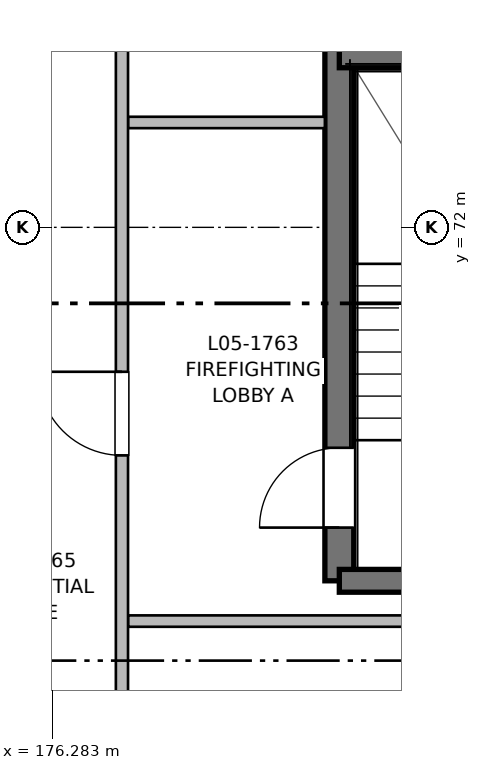
"""IFC4 building model, lengths in metres.
Left out: names, types, materials, properties, quantities, classifications, styles, units other than length and angle.
Written with IfcOpenShell. Run it as: python <this file> out.ifc"""

import sys

from ifc_helpers import new_model, si_unit, direction, frame, frame_2d, origin, place, context, subcontext, project, spatial, rectangle, extrude, element, fill, save


model = new_model("IFC4")
c1 = context("Model", 3, precision=1e-05, world=origin(), true_north=direction((0.0, 1.0)))
c2 = subcontext(c1, "Body", "Model", "MODEL_VIEW")
j1 = project(units=[si_unit("LENGTHUNIT", "METRE"), si_unit("PLANEANGLEUNIT", "RADIAN")], contexts=[c1])
p1 = place(None, origin())
s1 = spatial("IfcSite", under=j1, at=p1, CompositionType="ELEMENT")
p2 = place(p1, origin())
s2 = spatial("IfcBuilding", under=s1, at=p2, CompositionType="ELEMENT")
p3 = place(p2, frame((0.0, 0.0, 16.96)))
s3 = spatial("IfcBuildingStorey", under=s2, at=p3, CompositionType="ELEMENT", Elevation=16.96)
p4 = place(p3, frame((180.06, 67.35, 0.0), z_axis=(0.0, 0.0, 1.0), x_axis=(0.0, 1.0, 0.0)))
e1 = element("IfcWall", 1, at=p4, inside=s3, PredefinedType="SHEAR", context=c2, shape_type="SweptSolid", body=[
    extrude(rectangle(XDim=13.15, YDim=0.38, at=frame_2d((6.575, 0.0))), origin(), (0.0, 0.0, 1.0), 3.2),
])
p5 = place(p4, frame((0.7, 0.0, 0.0)))
e2 = element("IfcOpeningElement", 2, at=p5, cuts=e1, PredefinedType="OPENING", context=c2, shape_type="SweptSolid", body=[
    extrude(rectangle(XDim=1.05, YDim=2.15, at=frame_2d((0.525, 1.075))), frame((0.0, 0.2, 0.0), z_axis=(0.0, -1.0, 0.0), x_axis=(1.0, 0.0, 0.0)), (0.0, 0.0, 1.0), 0.4),
])
p6 = place(p3, frame((183.47, 67.35, 0.0), z_axis=(0.0, 0.0, 1.0), x_axis=(-1.0, 0.0, 0.0)))
e3 = element("IfcWall", 3, at=p6, inside=s3, PredefinedType="SHEAR", context=c2, shape_type="SweptSolid", body=[
    extrude(rectangle(XDim=3.41, YDim=0.3, at=frame_2d((1.705, 0.0))), origin(), (0.0, 0.0, 1.0), 3.2),
])
p7 = place(p3, frame((180.06, 74.24, 0.0), z_axis=(0.0, 0.0, 1.0), x_axis=(1.0, 0.0, 0.0)))
e4 = element("IfcWall", 4, at=p7, inside=s3, PredefinedType="SHEAR", context=c2, shape_type="SweptSolid", body=[
    extrude(rectangle(XDim=3.41, YDim=0.28, at=frame_2d((1.705, 0.0))), origin(), (0.0, 0.0, 1.0), 3.2),
])
p8 = place(p3, frame((177.28, 66.82, 0.0), z_axis=(0.0, 0.0, 1.0), x_axis=(1.0, 0.0, 0.0)))
e5 = element("IfcWall", 5, at=p8, inside=s3, PredefinedType="PARTITIONING", context=c2, shape_type="SweptSolid", body=[
    extrude(rectangle(XDim=6.59, YDim=0.15, at=frame_2d((3.295, 0.0))), origin(), (0.0, 0.0, 1.0), 2.935),
])
p9 = place(p3, frame((177.28, 73.38, 0.0), z_axis=(0.0, 0.0, 1.0), x_axis=(1.0, 0.0, 0.0)))
e6 = element("IfcWall", 6, at=p9, inside=s3, PredefinedType="PARTITIONING", context=c2, shape_type="SweptSolid", body=[
    extrude(rectangle(XDim=2.59, YDim=0.15, at=frame_2d((1.295, 0.0))), origin(), (0.0, 0.0, 1.0), 2.935),
])
p10 = place(p3, frame((177.2, 56.16, 0.0), z_axis=(0.0, 0.0, 1.0), x_axis=(0.0, 1.0, 0.0)))
e7 = element("IfcWall", 7, at=p10, inside=s3, PredefinedType="PARTITIONING", context=c2, shape_type="SweptSolid", body=[
    extrude(rectangle(XDim=50.64, YDim=0.16, at=frame_2d((25.32, 0.0))), origin(), (0.0, 0.0, 1.0), 2.935),
])
p11 = place(p10, frame((12.84, 0.0, 0.0)))
e8 = element("IfcOpeningElement", 8, at=p11, cuts=e7, PredefinedType="OPENING", context=c2, shape_type="SweptSolid", body=[
    extrude(rectangle(XDim=1.1, YDim=2.15, at=frame_2d((0.55, 1.075))), frame((0.0, 0.09, 0.0), z_axis=(0.0, -1.0, 0.0), x_axis=(1.0, 0.0, 0.0)), (0.0, 0.0, 1.0), 0.18),
])
p12 = place(p10, frame((19.24, 0.0, 0.0)))
e9 = element("IfcOpeningElement", 9, at=p12, cuts=e7, PredefinedType="OPENING", context=c2, shape_type="SweptSolid", body=[
    extrude(rectangle(XDim=1.6, YDim=2.15, at=frame_2d((0.8, 1.075))), frame((0.0, 0.09, 0.0), z_axis=(0.0, -1.0, 0.0), x_axis=(1.0, 0.0, 0.0)), (0.0, 0.0, 1.0), 0.18),
])
p13 = place(p10, frame((1.8, 0.0, 0.0)))
e10 = element("IfcOpeningElement", 10, at=p13, cuts=e7, PredefinedType="OPENING", context=c2, shape_type="SweptSolid", body=[
    extrude(rectangle(XDim=0.96, YDim=2.15, at=frame_2d((0.48, 1.075))), frame((0.0, 0.09, 0.0), z_axis=(0.0, -1.0, 0.0), x_axis=(1.0, 0.0, 0.0)), (0.0, 0.0, 1.0), 0.18),
])
p14 = place(p10, frame((33.17, 0.0, 0.0)))
e11 = element("IfcOpeningElement", 11, at=p14, cuts=e7, PredefinedType="OPENING", context=c2, shape_type="SweptSolid", body=[
    extrude(rectangle(XDim=0.98, YDim=2.15, at=frame_2d((0.49, 1.075))), frame((0.0, 0.09, 0.0), z_axis=(0.0, -1.0, 0.0), x_axis=(1.0, 0.0, 0.0)), (0.0, 0.0, 1.0), 0.18),
])
p15 = place(p10, frame((41.43, 0.0, 0.0)))
e12 = element("IfcOpeningElement", 12, at=p15, cuts=e7, PredefinedType="OPENING", context=c2, shape_type="SweptSolid", body=[
    extrude(rectangle(XDim=0.98, YDim=2.15, at=frame_2d((0.49, 1.075))), frame((0.0, 0.09, 0.0), z_axis=(0.0, -1.0, 0.0), x_axis=(1.0, 0.0, 0.0)), (0.0, 0.0, 1.0), 0.18),
])
p16 = place(p5, origin())
e13 = element("IfcDoor", 13, at=p16, inside=s3, OperationType="SINGLE_SWING_LEFT", PredefinedType="DOOR", context=c2, shape_type="SweptSolid", body=[
    extrude(rectangle(XDim=1.05, YDim=2.15, at=frame_2d((0.525, 1.075))), frame((0.0, 0.025, 0.0), z_axis=(0.0, -1.0, 0.0), x_axis=(1.0, 0.0, 0.0)), (0.0, 0.0, 1.0), 0.05),
])
fill(e2, e13)
p17 = place(p11, origin())
e14 = element("IfcDoor", 14, at=p17, inside=s3, OperationType="SINGLE_SWING_RIGHT", PredefinedType="DOOR", context=c2, shape_type="SweptSolid", body=[
    extrude(rectangle(XDim=1.1, YDim=2.15, at=frame_2d((0.55, 1.075))), frame((0.0, 0.025, 0.0), z_axis=(0.0, -1.0, 0.0), x_axis=(1.0, 0.0, 0.0)), (0.0, 0.0, 1.0), 0.05),
])
fill(e8, e14)
save(model, sys.argv[1])
